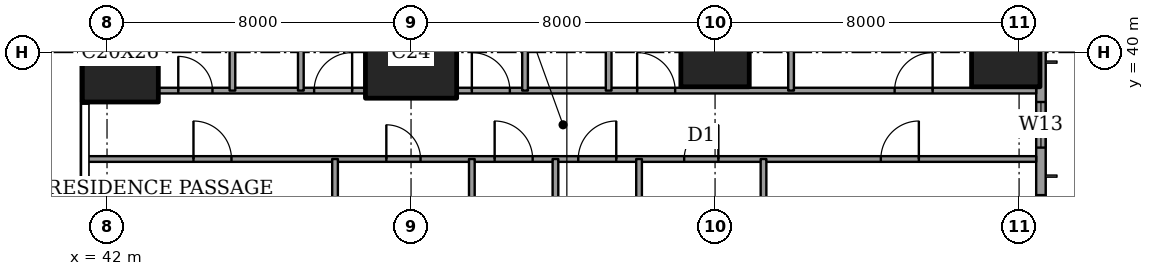
"""IFC4 building model, lengths in metres.
Left out: names, types, materials, properties, quantities, classifications, styles, units other than length and angle.
Written with IfcOpenShell. Run it as: python <this file> out.ifc"""

import sys

from ifc_helpers import new_model, si_unit, direction, frame, frame_2d, origin, origin_2d, place, context, subcontext, project, spatial, rectangle, extrude, element, fill, save


model = new_model("IFC4")
c1 = context("Model", 3, precision=1e-05, world=origin(), true_north=direction((0.0, 1.0)))
c2 = subcontext(c1, "Body", "Model", "MODEL_VIEW")
j1 = project(units=[si_unit("LENGTHUNIT", "METRE"), si_unit("PLANEANGLEUNIT", "RADIAN")], contexts=[c1])
p1 = place(None, origin())
s1 = spatial("IfcSite", under=j1, at=p1, CompositionType="ELEMENT")
p2 = place(p1, origin())
s2 = spatial("IfcBuilding", under=s1, at=p2, CompositionType="ELEMENT")
p3 = place(p2, frame((0.0, 0.0, 203.8)))
s3 = spatial("IfcBuildingStorey", under=s2, at=p3, CompositionType="ELEMENT", Elevation=203.8)
p4 = place(p3, frame((42.35, 40.0, 0.0), z_axis=(0.0, 0.0, 1.0), x_axis=(1.0, 0.0, 0.0)))
e1 = element("IfcColumn", 1, at=p4, inside=s3, PredefinedType="COLUMN", context=c2, shape_type="SweptSolid", body=[
    extrude(rectangle(XDim=2.0, YDim=2.6, at=origin_2d()), origin(), (0.0, 0.0, 1.0), 3.6),
])
p5 = place(p3, frame((50.0, 40.0, 0.0), z_axis=(0.0, 0.0, 1.0), x_axis=(1.0, 0.0, 0.0)))
e2 = element("IfcColumn", 2, at=p5, inside=s3, PredefinedType="COLUMN", context=c2, shape_type="SweptSolid", body=[
    extrude(rectangle(XDim=2.4, YDim=2.4, at=origin_2d()), origin(), (0.0, 0.0, 1.0), 3.6),
])
for number, where, z_axis, x_axis in (
    (3, (58.0, 40.0, 0.0), (0.0, 0.0, 1.0), (1.0, 0.0, 0.0)),
    (4, (65.65, 40.0, 0.0), (0.0, 0.0, 1.0), (1.0, 0.0, 0.0)),
):
    element("IfcColumn", number, at=place(p3, frame(where, z_axis=z_axis, x_axis=x_axis)), inside=s3, PredefinedType="COLUMN", context=c2, shape_type="SweptSolid", body=[
        extrude(rectangle(XDim=1.8, YDim=1.8, at=origin_2d()), origin(), (0.0, 0.0, 1.0), 3.6),
    ])
p6 = place(p3, frame((66.575, 3.175, 0.0), z_axis=(0.0, 0.0, 1.0), x_axis=(0.0, 1.0, 0.0)))
e5 = element("IfcWall", 5, at=p6, inside=s3, PredefinedType="SOLIDWALL", context=c2, shape_type="SweptSolid", body=[
    extrude(rectangle(XDim=41.65, YDim=0.25, at=frame_2d((20.825, 0.0))), origin(), (0.0, 0.0, 1.0), 3.6),
])
p7 = place(p6, frame((0.825, 0.0, 0.2)))
e6 = element("IfcOpeningElement", 6, at=p7, cuts=e5, PredefinedType="OPENING", context=c2, shape_type="SweptSolid", body=[
    extrude(rectangle(XDim=2.4, YDim=2.4, at=frame_2d((1.2, 1.2))), frame((0.0, 0.135, 0.0), z_axis=(0.0, -1.0, 0.0), x_axis=(1.0, 0.0, 0.0)), (0.0, 0.0, 1.0), 0.27),
])
p8 = place(p6, frame((6.6, 0.0, 0.2)))
e7 = element("IfcOpeningElement", 7, at=p8, cuts=e5, PredefinedType="OPENING", context=c2, shape_type="SweptSolid", body=[
    extrude(rectangle(XDim=1.2, YDim=2.4, at=frame_2d((0.6, 1.2))), frame((0.0, 0.135, 0.0), z_axis=(0.0, -1.0, 0.0), x_axis=(1.0, 0.0, 0.0)), (0.0, 0.0, 1.0), 0.27),
])
p9 = place(p6, frame((8.775, 0.0, 0.2)))
e8 = element("IfcOpeningElement", 8, at=p9, cuts=e5, PredefinedType="OPENING", context=c2, shape_type="SweptSolid", body=[
    extrude(rectangle(XDim=2.4, YDim=2.4, at=frame_2d((1.2, 1.2))), frame((0.0, 0.135, 0.0), z_axis=(0.0, -1.0, 0.0), x_axis=(1.0, 0.0, 0.0)), (0.0, 0.0, 1.0), 0.27),
])
p10 = place(p6, frame((15.675, 0.0, 0.2)))
e9 = element("IfcOpeningElement", 9, at=p10, cuts=e5, PredefinedType="OPENING", context=c2, shape_type="SweptSolid", body=[
    extrude(rectangle(XDim=2.4, YDim=2.4, at=frame_2d((1.2, 1.2))), frame((0.0, 0.135, 0.0), z_axis=(0.0, -1.0, 0.0), x_axis=(1.0, 0.0, 0.0)), (0.0, 0.0, 1.0), 0.27),
])
p11 = place(p6, frame((23.575, 0.0, 0.2)))
e10 = element("IfcOpeningElement", 10, at=p11, cuts=e5, PredefinedType="OPENING", context=c2, shape_type="SweptSolid", body=[
    extrude(rectangle(XDim=2.4, YDim=2.4, at=frame_2d((1.2, 1.2))), frame((0.0, 0.135, 0.0), z_axis=(0.0, -1.0, 0.0), x_axis=(1.0, 0.0, 0.0)), (0.0, 0.0, 1.0), 0.27),
])
p12 = place(p6, frame((30.675, 0.0, 0.2)))
e11 = element("IfcOpeningElement", 11, at=p12, cuts=e5, PredefinedType="OPENING", context=c2, shape_type="SweptSolid", body=[
    extrude(rectangle(XDim=2.4, YDim=2.4, at=frame_2d((1.2, 1.2))), frame((0.0, 0.135, 0.0), z_axis=(0.0, -1.0, 0.0), x_axis=(1.0, 0.0, 0.0)), (0.0, 0.0, 1.0), 0.27),
])
p13 = place(p6, frame((34.325, 0.0, 0.2)))
e12 = element("IfcOpeningElement", 12, at=p13, cuts=e5, PredefinedType="OPENING", context=c2, shape_type="SweptSolid", body=[
    extrude(rectangle(XDim=1.2, YDim=2.4, at=frame_2d((0.6, 1.2))), frame((0.0, 0.135, 0.0), z_axis=(0.0, -1.0, 0.0), x_axis=(1.0, 0.0, 0.0)), (0.0, 0.0, 1.0), 0.27),
])
p14 = place(p6, frame((38.425, 0.0, 0.2)))
e13 = element("IfcOpeningElement", 13, at=p14, cuts=e5, PredefinedType="OPENING", context=c2, shape_type="SweptSolid", body=[
    extrude(rectangle(XDim=2.4, YDim=2.4, at=frame_2d((1.2, 1.2))), frame((0.0, 0.135, 0.0), z_axis=(0.0, -1.0, 0.0), x_axis=(1.0, 0.0, 0.0)), (0.0, 0.0, 1.0), 0.27),
])
p15 = place(p3, frame((41.439, 37.2, 0.0), z_axis=(0.0, 0.0, 1.0), x_axis=(1.0, 0.0, 0.0)))
e14 = element("IfcWall", 14, at=p15, inside=s3, PredefinedType="PARTITIONING", context=c2, shape_type="SweptSolid", body=[
    extrude(rectangle(XDim=25.011, YDim=0.15, at=frame_2d((12.505, 0.0))), origin(), (0.0, 0.0, 1.0), 3.35),
])
p16 = place(p15, frame((10.761, 0.0, 0.0)))
e15 = element("IfcOpeningElement", 15, at=p16, cuts=e14, PredefinedType="OPENING", context=c2, shape_type="SweptSolid", body=[
    extrude(rectangle(XDim=1.0, YDim=2.1, at=frame_2d((0.5, 1.05))), frame((0.0, 0.085, 0.0), z_axis=(0.0, -1.0, 0.0), x_axis=(1.0, 0.0, 0.0)), (0.0, 0.0, 1.0), 0.17),
])
p17 = place(p15, frame((20.924, 0.0, 0.0)))
e16 = element("IfcOpeningElement", 16, at=p17, cuts=e14, PredefinedType="OPENING", context=c2, shape_type="SweptSolid", body=[
    extrude(rectangle(XDim=1.0, YDim=2.1, at=frame_2d((0.5, 1.05))), frame((0.0, 0.085, 0.0), z_axis=(0.0, -1.0, 0.0), x_axis=(1.0, 0.0, 0.0)), (0.0, 0.0, 1.0), 0.17),
])
p18 = place(p15, frame((15.749, 0.0, 0.0)))
e17 = element("IfcOpeningElement", 17, at=p18, cuts=e14, PredefinedType="OPENING", context=c2, shape_type="SweptSolid", body=[
    extrude(rectangle(XDim=0.9, YDim=2.1, at=frame_2d((0.45, 1.05))), frame((0.0, 0.085, 0.0), z_axis=(0.0, -1.0, 0.0), x_axis=(1.0, 0.0, 0.0)), (0.0, 0.0, 1.0), 0.17),
])
p19 = place(p15, frame((12.961, 0.0, 0.0)))
e18 = element("IfcOpeningElement", 18, at=p19, cuts=e14, PredefinedType="OPENING", context=c2, shape_type="SweptSolid", body=[
    extrude(rectangle(XDim=1.0, YDim=2.1, at=frame_2d((0.5, 1.05))), frame((0.0, 0.085, 0.0), z_axis=(0.0, -1.0, 0.0), x_axis=(1.0, 0.0, 0.0)), (0.0, 0.0, 1.0), 0.17),
])
p20 = place(p15, frame((7.911, 0.0, 0.0)))
e19 = element("IfcOpeningElement", 19, at=p20, cuts=e14, PredefinedType="OPENING", context=c2, shape_type="SweptSolid", body=[
    extrude(rectangle(XDim=0.9, YDim=2.1, at=frame_2d((0.45, 1.05))), frame((0.0, 0.085, 0.0), z_axis=(0.0, -1.0, 0.0), x_axis=(1.0, 0.0, 0.0)), (0.0, 0.0, 1.0), 0.17),
])
p21 = place(p15, frame((2.836, 0.0, 0.0)))
e20 = element("IfcOpeningElement", 20, at=p21, cuts=e14, PredefinedType="OPENING", context=c2, shape_type="SweptSolid", body=[
    extrude(rectangle(XDim=1.0, YDim=2.1, at=frame_2d((0.5, 1.05))), frame((0.0, 0.085, 0.0), z_axis=(0.0, -1.0, 0.0), x_axis=(1.0, 0.0, 0.0)), (0.0, 0.0, 1.0), 0.17),
])
p22 = place(p3, frame((43.35, 39.0, 0.0), z_axis=(0.0, 0.0, 1.0), x_axis=(1.0, 0.0, 0.0)))
e21 = element("IfcWall", 21, at=p22, inside=s3, PredefinedType="PARTITIONING", context=c2, shape_type="SweptSolid", body=[
    extrude(rectangle(XDim=5.45, YDim=0.15, at=frame_2d((2.725, 0.0))), origin(), (0.0, 0.0, 1.0), 3.35),
])
p23 = place(p22, frame((4.1, 0.0, 0.0)))
e22 = element("IfcOpeningElement", 22, at=p23, cuts=e21, PredefinedType="OPENING", context=c2, shape_type="SweptSolid", body=[
    extrude(rectangle(XDim=1.0, YDim=2.1, at=frame_2d((0.5, 1.05))), frame((0.0, 0.085, 0.0), z_axis=(0.0, -1.0, 0.0), x_axis=(1.0, 0.0, 0.0)), (0.0, 0.0, 1.0), 0.17),
])
p24 = place(p22, frame((0.525, 0.0, 0.0)))
e23 = element("IfcOpeningElement", 23, at=p24, cuts=e21, PredefinedType="OPENING", context=c2, shape_type="SweptSolid", body=[
    extrude(rectangle(XDim=0.9, YDim=2.1, at=frame_2d((0.45, 1.05))), frame((0.0, 0.085, 0.0), z_axis=(0.0, -1.0, 0.0), x_axis=(1.0, 0.0, 0.0)), (0.0, 0.0, 1.0), 0.17),
])
p25 = place(p3, frame((51.2, 39.0, 0.0), z_axis=(0.0, 0.0, 1.0), x_axis=(1.0, 0.0, 0.0)))
e24 = element("IfcWall", 24, at=p25, inside=s3, PredefinedType="PARTITIONING", context=c2, shape_type="SweptSolid", body=[
    extrude(rectangle(XDim=15.25, YDim=0.15, at=frame_2d((7.625, 0.0))), origin(), (0.0, 0.0, 1.0), 3.35),
])
p26 = place(p25, frame((11.525, 0.0, 0.0)))
e25 = element("IfcOpeningElement", 25, at=p26, cuts=e24, PredefinedType="OPENING", context=c2, shape_type="SweptSolid", body=[
    extrude(rectangle(XDim=1.0, YDim=2.1, at=frame_2d((0.5, 1.05))), frame((0.0, 0.085, 0.0), z_axis=(0.0, -1.0, 0.0), x_axis=(1.0, 0.0, 0.0)), (0.0, 0.0, 1.0), 0.17),
])
p27 = place(p25, frame((4.75, 0.0, 0.0)))
e26 = element("IfcOpeningElement", 26, at=p27, cuts=e24, PredefinedType="OPENING", context=c2, shape_type="SweptSolid", body=[
    extrude(rectangle(XDim=1.0, YDim=2.1, at=frame_2d((0.5, 1.05))), frame((0.0, 0.085, 0.0), z_axis=(0.0, -1.0, 0.0), x_axis=(1.0, 0.0, 0.0)), (0.0, 0.0, 1.0), 0.17),
])
p28 = place(p25, frame((0.4, 0.0, 0.0)))
e27 = element("IfcOpeningElement", 27, at=p28, cuts=e24, PredefinedType="OPENING", context=c2, shape_type="SweptSolid", body=[
    extrude(rectangle(XDim=1.0, YDim=2.1, at=frame_2d((0.5, 1.05))), frame((0.0, 0.085, 0.0), z_axis=(0.0, -1.0, 0.0), x_axis=(1.0, 0.0, 0.0)), (0.0, 0.0, 1.0), 0.17),
])
p29 = place(p3, frame((45.3, 39.0, 0.0), z_axis=(0.0, 0.0, 1.0), x_axis=(0.0, 1.0, 0.0)))
e28 = element("IfcWall", 28, at=p29, inside=s3, PredefinedType="PARTITIONING", context=c2, shape_type="SweptSolid", body=[
    extrude(rectangle(XDim=9.45, YDim=0.15, at=frame_2d((4.725, 0.0))), origin(), (0.0, 0.0, 1.0), 3.35),
])
p30 = place(p3, frame((47.1, 39.0, 0.0), z_axis=(0.0, 0.0, 1.0), x_axis=(0.0, 1.0, 0.0)))
e29 = element("IfcWall", 29, at=p30, inside=s3, PredefinedType="PARTITIONING", context=c2, shape_type="SweptSolid", body=[
    extrude(rectangle(XDim=4.7, YDim=0.15, at=frame_2d((2.35, 0.0))), origin(), (0.0, 0.0, 1.0), 3.35),
])
p31 = place(p30, frame((1.9, 0.0, 0.0)))
e30 = element("IfcOpeningElement", 30, at=p31, cuts=e29, PredefinedType="OPENING", context=c2, shape_type="SweptSolid", body=[
    extrude(rectangle(XDim=0.9, YDim=2.1, at=frame_2d((0.45, 1.05))), frame((0.0, 0.085, 0.0), z_axis=(0.0, -1.0, 0.0), x_axis=(1.0, 0.0, 0.0)), (0.0, 0.0, 1.0), 0.17),
])
p32 = place(p3, frame((48.0, 28.0, 0.0), z_axis=(0.0, 0.0, 1.0), x_axis=(0.0, 1.0, 0.0)))
e31 = element("IfcWall", 31, at=p32, inside=s3, PredefinedType="PARTITIONING", context=c2, shape_type="SweptSolid", body=[
    extrude(rectangle(XDim=9.2, YDim=0.15, at=frame_2d((4.6, 0.0))), origin(), (0.0, 0.0, 1.0), 3.35),
])
p33 = place(p32, frame((0.5, 0.0, 0.0)))
e32 = element("IfcOpeningElement", 32, at=p33, cuts=e31, PredefinedType="OPENING", context=c2, shape_type="SweptSolid", body=[
    extrude(rectangle(XDim=1.0, YDim=2.1, at=frame_2d((0.5, 1.05))), frame((0.0, 0.085, 0.0), z_axis=(0.0, -1.0, 0.0), x_axis=(1.0, 0.0, 0.0)), (0.0, 0.0, 1.0), 0.17),
])
p34 = place(p3, frame((51.6, 30.0, 0.0), z_axis=(0.0, 0.0, 1.0), x_axis=(0.0, 1.0, 0.0)))
e33 = element("IfcWall", 33, at=p34, inside=s3, PredefinedType="PARTITIONING", context=c2, shape_type="SweptSolid", body=[
    extrude(rectangle(XDim=7.2, YDim=0.15, at=frame_2d((3.6, 0.0))), origin(), (0.0, 0.0, 1.0), 3.35),
])
p35 = place(p3, frame((53.0, 39.0, 0.0), z_axis=(0.0, 0.0, 1.0), x_axis=(0.0, 1.0, 0.0)))
e34 = element("IfcWall", 34, at=p35, inside=s3, PredefinedType="PARTITIONING", context=c2, shape_type="SweptSolid", body=[
    extrude(rectangle(XDim=9.45, YDim=0.15, at=frame_2d((4.725, 0.0))), origin(), (0.0, 0.0, 1.0), 3.35),
])
p36 = place(p3, frame((53.8, 30.0, 0.0), z_axis=(0.0, 0.0, 1.0), x_axis=(0.0, 1.0, 0.0)))
e35 = element("IfcWall", 35, at=p36, inside=s3, PredefinedType="PARTITIONING", context=c2, shape_type="SweptSolid", body=[
    extrude(rectangle(XDim=7.2, YDim=0.15, at=frame_2d((3.6, 0.0))), origin(), (0.0, 0.0, 1.0), 3.35),
])
p37 = place(p3, frame((55.2, 39.0, 0.0), z_axis=(0.0, 0.0, 1.0), x_axis=(0.0, 1.0, 0.0)))
e36 = element("IfcWall", 36, at=p37, inside=s3, PredefinedType="PARTITIONING", context=c2, shape_type="SweptSolid", body=[
    extrude(rectangle(XDim=3.4, YDim=0.15, at=frame_2d((1.7, 0.0))), origin(), (0.0, 0.0, 1.0), 3.35),
])
p38 = place(p37, frame((1.25, 0.0, 0.0)))
e37 = element("IfcOpeningElement", 37, at=p38, cuts=e36, PredefinedType="OPENING", context=c2, shape_type="SweptSolid", body=[
    extrude(rectangle(XDim=0.9, YDim=2.1, at=frame_2d((0.45, 1.05))), frame((0.0, 0.085, 0.0), z_axis=(0.0, -1.0, 0.0), x_axis=(1.0, 0.0, 0.0)), (0.0, 0.0, 1.0), 0.17),
])
p39 = place(p3, frame((56.0, 28.0, 0.0), z_axis=(0.0, 0.0, 1.0), x_axis=(0.0, 1.0, 0.0)))
e38 = element("IfcWall", 38, at=p39, inside=s3, PredefinedType="PARTITIONING", context=c2, shape_type="SweptSolid", body=[
    extrude(rectangle(XDim=9.2, YDim=0.15, at=frame_2d((4.6, 0.0))), origin(), (0.0, 0.0, 1.0), 3.35),
])
p40 = place(p39, frame((0.5, 0.0, 0.0)))
e39 = element("IfcOpeningElement", 39, at=p40, cuts=e38, PredefinedType="OPENING", context=c2, shape_type="SweptSolid", body=[
    extrude(rectangle(XDim=1.0, YDim=2.1, at=frame_2d((0.5, 1.05))), frame((0.0, 0.085, 0.0), z_axis=(0.0, -1.0, 0.0), x_axis=(1.0, 0.0, 0.0)), (0.0, 0.0, 1.0), 0.17),
])
p41 = place(p3, frame((59.275, 33.2, 0.0), z_axis=(0.0, 0.0, 1.0), x_axis=(0.0, 1.0, 0.0)))
e40 = element("IfcWall", 40, at=p41, inside=s3, PredefinedType="PARTITIONING", context=c2, shape_type="SweptSolid", body=[
    extrude(rectangle(XDim=4.0, YDim=0.15, at=frame_2d((2.0, 0.0))), origin(), (0.0, 0.0, 1.0), 3.35),
])
p42 = place(p3, frame((60.0, 39.0, 0.0), z_axis=(0.0, 0.0, 1.0), x_axis=(0.0, 1.0, 0.0)))
e41 = element("IfcWall", 41, at=p42, inside=s3, PredefinedType="PARTITIONING", context=c2, shape_type="SweptSolid", body=[
    extrude(rectangle(XDim=9.45, YDim=0.15, at=frame_2d((4.725, 0.0))), origin(), (0.0, 0.0, 1.0), 3.35),
])
p43 = place(p12, origin())
e42 = element("IfcWindow", 42, at=p43, inside=s3, PartitioningType="SINGLE_PANEL", PredefinedType="WINDOW", context=c2, shape_type="SweptSolid", body=[
    extrude(rectangle(XDim=2.4, YDim=2.4, at=frame_2d((1.2, 1.2))), frame((0.0, 0.03, 0.0), z_axis=(0.0, -1.0, 0.0), x_axis=(1.0, 0.0, 0.0)), (0.0, 0.0, 1.0), 0.06),
])
fill(e11, e42)
p44 = place(p13, origin())
e43 = element("IfcWindow", 43, at=p44, inside=s3, PartitioningType="SINGLE_PANEL", PredefinedType="WINDOW", context=c2, shape_type="SweptSolid", body=[
    extrude(rectangle(XDim=1.2, YDim=2.4, at=frame_2d((0.6, 1.2))), frame((0.0, 0.03, 0.0), z_axis=(0.0, -1.0, 0.0), x_axis=(1.0, 0.0, 0.0)), (0.0, 0.0, 1.0), 0.06),
])
fill(e12, e43)
p45 = place(p26, origin())
e44 = element("IfcDoor", 44, at=p45, inside=s3, OperationType="SINGLE_SWING_LEFT", PredefinedType="DOOR", context=c2, shape_type="SweptSolid", body=[
    extrude(rectangle(XDim=1.0, YDim=2.1, at=frame_2d((0.5, 1.05))), frame((0.0, 0.025, 0.0), z_axis=(0.0, -1.0, 0.0), x_axis=(1.0, 0.0, 0.0)), (0.0, 0.0, 1.0), 0.05),
])
fill(e25, e44)
p46 = place(p27, origin())
e45 = element("IfcDoor", 45, at=p46, inside=s3, OperationType="SINGLE_SWING_RIGHT", PredefinedType="DOOR", context=c2, shape_type="SweptSolid", body=[
    extrude(rectangle(XDim=1.0, YDim=2.1, at=frame_2d((0.5, 1.05))), frame((0.0, 0.025, 0.0), z_axis=(0.0, -1.0, 0.0), x_axis=(1.0, 0.0, 0.0)), (0.0, 0.0, 1.0), 0.05),
])
fill(e26, e45)
p47 = place(p28, origin())
e46 = element("IfcDoor", 46, at=p47, inside=s3, OperationType="SINGLE_SWING_RIGHT", PredefinedType="DOOR", context=c2, shape_type="SweptSolid", body=[
    extrude(rectangle(XDim=1.0, YDim=2.1, at=frame_2d((0.5, 1.05))), frame((0.0, 0.025, 0.0), z_axis=(0.0, -1.0, 0.0), x_axis=(1.0, 0.0, 0.0)), (0.0, 0.0, 1.0), 0.05),
])
fill(e27, e46)
p48 = place(p23, origin())
e47 = element("IfcDoor", 47, at=p48, inside=s3, OperationType="SINGLE_SWING_LEFT", PredefinedType="DOOR", context=c2, shape_type="SweptSolid", body=[
    extrude(rectangle(XDim=1.0, YDim=2.1, at=frame_2d((0.5, 1.05))), frame((0.0, 0.025, 0.0), z_axis=(0.0, -1.0, 0.0), x_axis=(1.0, 0.0, 0.0)), (0.0, 0.0, 1.0), 0.05),
])
fill(e22, e47)
p49 = place(p24, origin())
e48 = element("IfcDoor", 48, at=p49, inside=s3, OperationType="SINGLE_SWING_RIGHT", PredefinedType="DOOR", context=c2, shape_type="SweptSolid", body=[
    extrude(rectangle(XDim=0.9, YDim=2.1, at=frame_2d((0.45, 1.05))), frame((0.0, 0.025, 0.0), z_axis=(0.0, -1.0, 0.0), x_axis=(1.0, 0.0, 0.0)), (0.0, 0.0, 1.0), 0.05),
])
fill(e23, e48)
p50 = place(p16, origin())
e49 = element("IfcDoor", 49, at=p50, inside=s3, OperationType="SINGLE_SWING_RIGHT", PredefinedType="DOOR", context=c2, shape_type="SweptSolid", body=[
    extrude(rectangle(XDim=1.0, YDim=2.1, at=frame_2d((0.5, 1.05))), frame((0.0, 0.025, 0.0), z_axis=(0.0, -1.0, 0.0), x_axis=(1.0, 0.0, 0.0)), (0.0, 0.0, 1.0), 0.05),
])
fill(e15, e49)
p51 = place(p17, origin())
e50 = element("IfcDoor", 50, at=p51, inside=s3, OperationType="SINGLE_SWING_LEFT", PredefinedType="DOOR", context=c2, shape_type="SweptSolid", body=[
    extrude(rectangle(XDim=1.0, YDim=2.1, at=frame_2d((0.5, 1.05))), frame((0.0, 0.025, 0.0), z_axis=(0.0, -1.0, 0.0), x_axis=(1.0, 0.0, 0.0)), (0.0, 0.0, 1.0), 0.05),
])
fill(e16, e50)
p52 = place(p18, origin())
e51 = element("IfcDoor", 51, at=p52, inside=s3, OperationType="SINGLE_SWING_LEFT", PredefinedType="DOOR", context=c2, shape_type="SweptSolid", body=[
    extrude(rectangle(XDim=0.9, YDim=2.1, at=frame_2d((0.45, 1.05))), frame((0.0, 0.025, 0.0), z_axis=(0.0, -1.0, 0.0), x_axis=(1.0, 0.0, 0.0)), (0.0, 0.0, 1.0), 0.05),
])
fill(e17, e51)
p53 = place(p19, origin())
e52 = element("IfcDoor", 52, at=p53, inside=s3, OperationType="SINGLE_SWING_LEFT", PredefinedType="DOOR", context=c2, shape_type="SweptSolid", body=[
    extrude(rectangle(XDim=1.0, YDim=2.1, at=frame_2d((0.5, 1.05))), frame((0.0, 0.025, 0.0), z_axis=(0.0, -1.0, 0.0), x_axis=(1.0, 0.0, 0.0)), (0.0, 0.0, 1.0), 0.05),
])
fill(e18, e52)
p54 = place(p20, origin())
e53 = element("IfcDoor", 53, at=p54, inside=s3, OperationType="SINGLE_SWING_RIGHT", PredefinedType="DOOR", context=c2, shape_type="SweptSolid", body=[
    extrude(rectangle(XDim=0.9, YDim=2.1, at=frame_2d((0.45, 1.05))), frame((0.0, 0.025, 0.0), z_axis=(0.0, -1.0, 0.0), x_axis=(1.0, 0.0, 0.0)), (0.0, 0.0, 1.0), 0.05),
])
fill(e19, e53)
p55 = place(p21, origin())
e54 = element("IfcDoor", 54, at=p55, inside=s3, OperationType="SINGLE_SWING_RIGHT", PredefinedType="DOOR", context=c2, shape_type="SweptSolid", body=[
    extrude(rectangle(XDim=1.0, YDim=2.1, at=frame_2d((0.5, 1.05))), frame((0.0, 0.025, 0.0), z_axis=(0.0, -1.0, 0.0), x_axis=(1.0, 0.0, 0.0)), (0.0, 0.0, 1.0), 0.05),
])
fill(e20, e54)
save(model, sys.argv[1])
